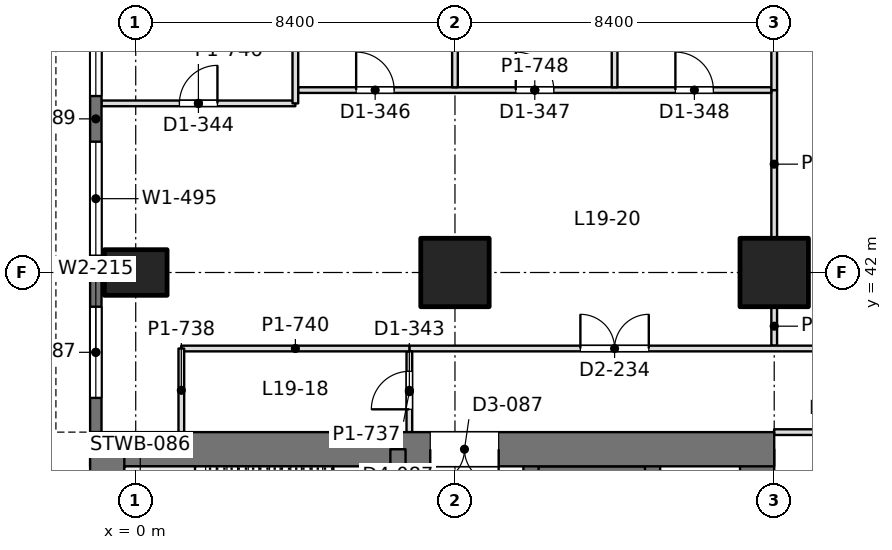
"""IFC4 building model, lengths in metres.
Left out: names, types, materials, properties, quantities, classifications, styles, units other than length and angle.
Written with IfcOpenShell. Run it as: python <this file> out.ifc"""

import sys

from ifc_helpers import new_model, si_unit, direction, frame, frame_2d, origin, origin_2d, place, context, subcontext, project, spatial, rectangle, extrude, element, fill, save


model = new_model("IFC4")
c1 = context("Model", 3, precision=1e-05, world=origin(), true_north=direction((0.0, 1.0)))
c2 = subcontext(c1, "Body", "Model", "MODEL_VIEW")
j1 = project(units=[si_unit("LENGTHUNIT", "METRE"), si_unit("PLANEANGLEUNIT", "RADIAN")], contexts=[c1])
p1 = place(None, origin())
s1 = spatial("IfcSite", under=j1, at=p1, CompositionType="ELEMENT")
p2 = place(p1, origin())
s2 = spatial("IfcBuilding", under=s1, at=p2, CompositionType="ELEMENT")
p3 = place(p2, frame((0.0, 0.0, 86.4)))
s3 = spatial("IfcBuildingStorey", under=s2, at=p3, CompositionType="ELEMENT", Elevation=86.4)
p4 = place(p3, frame((0.0, 42.0, 0.0), z_axis=(0.0, 0.0, 1.0), x_axis=(0.0, 1.0, 0.0)))
e1 = element("IfcColumn", 1, at=p4, inside=s3, PredefinedType="COLUMN", context=c2, shape_type="SweptSolid", body=[
    extrude(rectangle(XDim=1.2, YDim=1.65, at=origin_2d()), origin(), (0.0, 0.0, 1.0), 4.5),
])
for number, where, z_axis, x_axis in (
    (2, (8.4, 42.0, 0.0), (0.0, 0.0, 1.0), (1.0, 0.0, 0.0)),
    (3, (16.8, 42.0, 0.0), (0.0, 0.0, 1.0), (1.0, 0.0, 0.0)),
):
    element("IfcColumn", number, at=place(p3, frame(where, z_axis=z_axis, x_axis=x_axis)), inside=s3, PredefinedType="COLUMN", context=c2, shape_type="SweptSolid", body=[
        extrude(rectangle(XDim=1.8, YDim=1.8, at=origin_2d()), origin(), (0.0, 0.0, 1.0), 4.5),
    ])
p5 = place(p3, frame((-1.2, 37.35, 0.0), z_axis=(0.0, 0.0, 1.0), x_axis=(1.0, 0.0, 0.0)))
e4 = element("IfcWall", 4, at=p5, inside=s3, PredefinedType="SHEAR", context=c2, shape_type="SweptSolid", body=[
    extrude(rectangle(XDim=18.0, YDim=0.9, at=frame_2d((9.0, 0.0))), origin(), (0.0, 0.0, 1.0), 4.5),
])
p6 = place(p5, frame((8.95, 0.0, 0.0)))
e5 = element("IfcOpeningElement", 5, at=p6, cuts=e4, PredefinedType="OPENING", context=c2, shape_type="SweptSolid", body=[
    extrude(rectangle(XDim=1.8, YDim=2.4, at=frame_2d((0.9, 1.2))), frame((0.0, 0.46, 0.0), z_axis=(0.0, -1.0, 0.0), x_axis=(1.0, 0.0, 0.0)), (0.0, 0.0, 1.0), 0.92),
])
for number, where, z_axis, x_axis in (
    (6, (-0.75, 13.05, 0.0), (0.0, 0.0, 1.0), (0.0, 1.0, 0.0)),
    (7, (16.35, 13.05, 0.0), (0.0, 0.0, 1.0), (0.0, 1.0, 0.0)),
):
    element("IfcWall", number, at=place(p3, frame(where, z_axis=z_axis, x_axis=x_axis)), inside=s3, PredefinedType="SHEAR", context=c2, shape_type="SweptSolid", body=[
        extrude(rectangle(XDim=24.3, YDim=0.9, at=frame_2d((12.15, 0.0))), origin(), (0.0, 0.0, 1.0), 4.5),
    ])
p7 = place(p3, frame((6.9, 13.05, 0.0), z_axis=(0.0, 0.0, 1.0), x_axis=(0.0, 1.0, 0.0)))
e8 = element("IfcWall", 8, at=p7, inside=s3, PredefinedType="SHEAR", context=c2, shape_type="SweptSolid", body=[
    extrude(rectangle(XDim=24.3, YDim=0.4, at=frame_2d((12.15, 0.0))), origin(), (0.0, 0.0, 1.0), 4.5),
])
p8 = place(p7, frame((1.3, 0.0, 0.0)))
e9 = element("IfcOpeningElement", 9, at=p8, cuts=e8, PredefinedType="OPENING", context=c2, shape_type="SweptSolid", body=[
    extrude(rectangle(XDim=1.0, YDim=2.2, at=frame_2d((0.5, 1.1))), frame((0.0, 0.21, 0.0), z_axis=(0.0, -1.0, 0.0), x_axis=(1.0, 0.0, 0.0)), (0.0, 0.0, 1.0), 0.42),
])
p9 = place(p7, frame((22.0, 0.0, 0.0)))
e10 = element("IfcOpeningElement", 10, at=p9, cuts=e8, PredefinedType="OPENING", context=c2, shape_type="SweptSolid", body=[
    extrude(rectangle(XDim=1.0, YDim=2.2, at=frame_2d((0.5, 1.1))), frame((0.0, 0.21, 0.0), z_axis=(0.0, -1.0, 0.0), x_axis=(1.0, 0.0, 0.0)), (0.0, 0.0, 1.0), 0.42),
])
p10 = place(p7, frame((5.55, 0.0, 0.0)))
e11 = element("IfcOpeningElement", 11, at=p10, cuts=e8, PredefinedType="OPENING", context=c2, shape_type="SweptSolid", body=[
    extrude(rectangle(XDim=1.0, YDim=2.2, at=frame_2d((0.5, 1.1))), frame((0.0, 0.21, 0.0), z_axis=(0.0, -1.0, 0.0), x_axis=(1.0, 0.0, 0.0)), (0.0, 0.0, 1.0), 0.42),
])
p11 = place(p7, frame((9.55, 0.0, 0.0)))
e12 = element("IfcOpeningElement", 12, at=p11, cuts=e8, PredefinedType="OPENING", context=c2, shape_type="SweptSolid", body=[
    extrude(rectangle(XDim=1.0, YDim=2.2, at=frame_2d((0.5, 1.1))), frame((0.0, 0.21, 0.0), z_axis=(0.0, -1.0, 0.0), x_axis=(1.0, 0.0, 0.0)), (0.0, 0.0, 1.0), 0.42),
])
p12 = place(p7, frame((12.8, 0.0, 0.0)))
e13 = element("IfcOpeningElement", 13, at=p12, cuts=e8, PredefinedType="OPENING", context=c2, shape_type="SweptSolid", body=[
    extrude(rectangle(XDim=1.1, YDim=2.2, at=frame_2d((0.55, 1.1))), frame((0.0, 0.21, 0.0), z_axis=(0.0, -1.0, 0.0), x_axis=(1.0, 0.0, 0.0)), (0.0, 0.0, 1.0), 0.42),
])
p13 = place(p7, frame((15.538, 0.0, 0.0)))
e14 = element("IfcOpeningElement", 14, at=p13, cuts=e8, PredefinedType="OPENING", context=c2, shape_type="SweptSolid", body=[
    extrude(rectangle(XDim=1.1, YDim=2.2, at=frame_2d((0.55, 1.1))), frame((0.0, 0.21, 0.0), z_axis=(0.0, -1.0, 0.0), x_axis=(1.0, 0.0, 0.0)), (0.0, 0.0, 1.0), 0.42),
])
p14 = place(p7, frame((18.262, 0.0, 0.0)))
e15 = element("IfcOpeningElement", 15, at=p14, cuts=e8, PredefinedType="OPENING", context=c2, shape_type="SweptSolid", body=[
    extrude(rectangle(XDim=1.1, YDim=2.2, at=frame_2d((0.55, 1.1))), frame((0.0, 0.21, 0.0), z_axis=(0.0, -1.0, 0.0), x_axis=(1.0, 0.0, 0.0)), (0.0, 0.0, 1.0), 0.42),
])
p15 = place(p3, frame((10.4, 13.05, 0.0), z_axis=(0.0, 0.0, 1.0), x_axis=(0.0, 1.0, 0.0)))
e16 = element("IfcWall", 16, at=p15, inside=s3, PredefinedType="SHEAR", context=c2, shape_type="SweptSolid", body=[
    extrude(rectangle(XDim=24.3, YDim=0.4, at=frame_2d((12.15, 0.0))), origin(), (0.0, 0.0, 1.0), 4.5),
])
p16 = place(p15, frame((1.5, 0.0, 0.0)))
e17 = element("IfcOpeningElement", 17, at=p16, cuts=e16, PredefinedType="OPENING", context=c2, shape_type="SweptSolid", body=[
    extrude(rectangle(XDim=1.1, YDim=2.2, at=frame_2d((0.55, 1.1))), frame((0.0, 0.21, 0.0), z_axis=(0.0, -1.0, 0.0), x_axis=(1.0, 0.0, 0.0)), (0.0, 0.0, 1.0), 0.42),
])
p17 = place(p15, frame((4.35, 0.0, 0.0)))
e18 = element("IfcOpeningElement", 18, at=p17, cuts=e16, PredefinedType="OPENING", context=c2, shape_type="SweptSolid", body=[
    extrude(rectangle(XDim=1.1, YDim=2.2, at=frame_2d((0.55, 1.1))), frame((0.0, 0.21, 0.0), z_axis=(0.0, -1.0, 0.0), x_axis=(1.0, 0.0, 0.0)), (0.0, 0.0, 1.0), 0.42),
])
p18 = place(p15, frame((7.2, 0.0, 0.0)))
e19 = element("IfcOpeningElement", 19, at=p18, cuts=e16, PredefinedType="OPENING", context=c2, shape_type="SweptSolid", body=[
    extrude(rectangle(XDim=1.1, YDim=2.2, at=frame_2d((0.55, 1.1))), frame((0.0, 0.21, 0.0), z_axis=(0.0, -1.0, 0.0), x_axis=(1.0, 0.0, 0.0)), (0.0, 0.0, 1.0), 0.42),
])
p19 = place(p15, frame((21.45, 0.0, 0.0)))
e20 = element("IfcOpeningElement", 20, at=p19, cuts=e16, PredefinedType="OPENING", context=c2, shape_type="SweptSolid", body=[
    extrude(rectangle(XDim=1.1, YDim=2.2, at=frame_2d((0.55, 1.1))), frame((0.0, 0.21, 0.0), z_axis=(0.0, -1.0, 0.0), x_axis=(1.0, 0.0, 0.0)), (0.0, 0.0, 1.0), 0.42),
])
p20 = place(p3, frame((13.6, 13.05, 0.0), z_axis=(0.0, 0.0, 1.0), x_axis=(0.0, 1.0, 0.0)))
e21 = element("IfcWall", 21, at=p20, inside=s3, PredefinedType="SHEAR", context=c2, shape_type="SweptSolid", body=[
    extrude(rectangle(XDim=24.3, YDim=0.4, at=frame_2d((12.15, 0.0))), origin(), (0.0, 0.0, 1.0), 4.5),
])
p21 = place(p3, frame((10.4, 36.625, 0.0), z_axis=(0.0, 0.0, 1.0), x_axis=(1.0, 0.0, 0.0)))
e22 = element("IfcWall", 22, at=p21, inside=s3, PredefinedType="SHEAR", context=c2, shape_type="SweptSolid", body=[
    extrude(rectangle(XDim=3.2, YDim=0.55, at=frame_2d((1.6, 0.0))), origin(), (0.0, 0.0, 1.0), 4.5),
])
p22 = place(p3, frame((-1.05, 37.8, 0.0), z_axis=(0.0, 0.0, 1.0), x_axis=(0.0, 1.0, 0.0)))
e23 = element("IfcWall", 23, at=p22, inside=s3, PredefinedType="SOLIDWALL", context=c2, shape_type="SweptSolid", body=[
    extrude(rectangle(XDim=4.2, YDim=0.3, at=frame_2d((2.1, 0.0))), origin(), (0.0, 0.0, 1.0), 4.3),
])
p23 = place(p22, frame((0.9, 0.0, 0.9)))
e24 = element("IfcOpeningElement", 24, at=p23, cuts=e23, PredefinedType="OPENING", context=c2, shape_type="SweptSolid", body=[
    extrude(rectangle(XDim=2.4, YDim=1.9, at=frame_2d((1.2, 0.95))), frame((0.0, 0.16, 0.0), z_axis=(0.0, -1.0, 0.0), x_axis=(1.0, 0.0, 0.0)), (0.0, 0.0, 1.0), 0.32),
])
p24 = place(p3, frame((-1.05, 42.0, 0.0), z_axis=(0.0, 0.0, 1.0), x_axis=(0.0, 1.0, 0.0)))
e25 = element("IfcWall", 25, at=p24, inside=s3, PredefinedType="SOLIDWALL", context=c2, shape_type="SweptSolid", body=[
    extrude(rectangle(XDim=8.085, YDim=0.3, at=frame_2d((4.042, 0.0))), origin(), (0.0, 0.0, 1.0), 4.3),
])
p25 = place(p24, frame((0.443, 0.0, 0.9)))
e26 = element("IfcOpeningElement", 26, at=p25, cuts=e25, PredefinedType="OPENING", context=c2, shape_type="SweptSolid", body=[
    extrude(rectangle(XDim=3.0, YDim=1.9, at=frame_2d((1.5, 0.95))), frame((0.0, 0.16, 0.0), z_axis=(0.0, -1.0, 0.0), x_axis=(1.0, 0.0, 0.0)), (0.0, 0.0, 1.0), 0.32),
])
p26 = place(p24, frame((4.643, 0.0, 0.9)))
e27 = element("IfcOpeningElement", 27, at=p26, cuts=e25, PredefinedType="OPENING", context=c2, shape_type="SweptSolid", body=[
    extrude(rectangle(XDim=3.0, YDim=1.9, at=frame_2d((1.5, 0.95))), frame((0.0, 0.16, 0.0), z_axis=(0.0, -1.0, 0.0), x_axis=(1.0, 0.0, 0.0)), (0.0, 0.0, 1.0), 0.32),
])
p27 = place(p3, frame((-0.902, 46.45, 0.0), z_axis=(0.0, 0.0, 1.0), x_axis=(1.0, 0.0, 0.0)))
e28 = element("IfcWall", 28, at=p27, inside=s3, PredefinedType="PARTITIONING", context=c2, shape_type="SweptSolid", body=[
    extrude(rectangle(XDim=5.102, YDim=0.15, at=frame_2d((2.551, 0.0))), origin(), (0.0, 0.0, 1.0), 3.7),
])
p28 = place(p27, frame((2.052, 0.0, 0.0)))
e29 = element("IfcOpeningElement", 29, at=p28, cuts=e28, PredefinedType="OPENING", context=c2, shape_type="SweptSolid", body=[
    extrude(rectangle(XDim=1.0, YDim=2.2, at=frame_2d((0.5, 1.1))), frame((0.0, 0.085, 0.0), z_axis=(0.0, -1.0, 0.0), x_axis=(1.0, 0.0, 0.0)), (0.0, 0.0, 1.0), 0.17),
])
p29 = place(p3, frame((4.274, 46.8, 0.0), z_axis=(0.0, 0.0, 1.0), x_axis=(1.0, 0.0, 0.0)))
e30 = element("IfcWall", 30, at=p29, inside=s3, PredefinedType="PARTITIONING", context=c2, shape_type="SweptSolid", body=[
    extrude(rectangle(XDim=12.452, YDim=0.15, at=frame_2d((6.226, 0.0))), origin(), (0.0, 0.0, 1.0), 3.6),
])
p30 = place(p29, frame((1.526, 0.0, 0.0)))
e31 = element("IfcOpeningElement", 31, at=p30, cuts=e30, PredefinedType="OPENING", context=c2, shape_type="SweptSolid", body=[
    extrude(rectangle(XDim=1.0, YDim=2.2, at=frame_2d((0.5, 1.1))), frame((0.0, 0.085, 0.0), z_axis=(0.0, -1.0, 0.0), x_axis=(1.0, 0.0, 0.0)), (0.0, 0.0, 1.0), 0.17),
])
p31 = place(p29, frame((5.726, 0.0, 0.0)))
e32 = element("IfcOpeningElement", 32, at=p31, cuts=e30, PredefinedType="OPENING", context=c2, shape_type="SweptSolid", body=[
    extrude(rectangle(XDim=1.0, YDim=2.2, at=frame_2d((0.5, 1.1))), frame((0.0, 0.085, 0.0), z_axis=(0.0, -1.0, 0.0), x_axis=(1.0, 0.0, 0.0)), (0.0, 0.0, 1.0), 0.17),
])
p32 = place(p29, frame((9.926, 0.0, 0.0)))
e33 = element("IfcOpeningElement", 33, at=p32, cuts=e30, PredefinedType="OPENING", context=c2, shape_type="SweptSolid", body=[
    extrude(rectangle(XDim=1.0, YDim=2.2, at=frame_2d((0.5, 1.1))), frame((0.0, 0.085, 0.0), z_axis=(0.0, -1.0, 0.0), x_axis=(1.0, 0.0, 0.0)), (0.0, 0.0, 1.0), 0.17),
])
p33 = place(p3, frame((4.2, 46.45, 0.0), z_axis=(0.0, 0.0, 1.0), x_axis=(0.0, 1.0, 0.0)))
e34 = element("IfcWall", 34, at=p33, inside=s3, PredefinedType="PARTITIONING", context=c2, shape_type="SweptSolid", body=[
    extrude(rectangle(XDim=4.852, YDim=0.15, at=frame_2d((2.426, 0.0))), origin(), (0.0, 0.0, 1.0), 3.854),
])
p34 = place(p3, frame((8.4, 46.874, 0.0), z_axis=(0.0, 0.0, 1.0), x_axis=(0.0, 1.0, 0.0)))
e35 = element("IfcWall", 35, at=p34, inside=s3, PredefinedType="PARTITIONING", context=c2, shape_type="SweptSolid", body=[
    extrude(rectangle(XDim=2.727, YDim=0.15, at=frame_2d((1.364, 0.0))), origin(), (0.0, 0.0, 1.0), 3.6),
])
p35 = place(p3, frame((12.6, 46.874, 0.0), z_axis=(0.0, 0.0, 1.0), x_axis=(0.0, 1.0, 0.0)))
e36 = element("IfcWall", 36, at=p35, inside=s3, PredefinedType="PARTITIONING", context=c2, shape_type="SweptSolid", body=[
    extrude(rectangle(XDim=4.428, YDim=0.15, at=frame_2d((2.214, 0.0))), origin(), (0.0, 0.0, 1.0), 3.854),
])
p36 = place(p3, frame((16.8, 46.798, 0.0), z_axis=(0.0, 0.0, 1.0), x_axis=(0.0, 1.0, 0.0)))
e37 = element("IfcWall", 37, at=p36, inside=s3, PredefinedType="PARTITIONING", context=c2, shape_type="SweptSolid", body=[
    extrude(rectangle(XDim=2.803, YDim=0.15, at=frame_2d((1.401, 0.0))), origin(), (0.0, 0.0, 1.0), 3.6),
])
p37 = place(p3, frame((16.8, 40.074, 0.0), z_axis=(0.0, 0.0, 1.0), x_axis=(0.0, 1.0, 0.0)))
e38 = element("IfcWall", 38, at=p37, inside=s3, PredefinedType="PARTITIONING", context=c2, shape_type="SweptSolid", body=[
    extrude(rectangle(XDim=1.027, YDim=0.15, at=frame_2d((0.514, 0.0))), origin(), (0.0, 0.0, 1.0), 3.804),
])
p38 = place(p3, frame((16.8, 42.899, 0.0), z_axis=(0.0, 0.0, 1.0), x_axis=(0.0, 1.0, 0.0)))
e39 = element("IfcWall", 39, at=p38, inside=s3, PredefinedType="PARTITIONING", context=c2, shape_type="SweptSolid", body=[
    extrude(rectangle(XDim=3.903, YDim=0.15, at=frame_2d((1.952, 0.0))), origin(), (0.0, 0.0, 1.0), 3.6),
])
p39 = place(p3, frame((7.198, 40.0, 0.0), z_axis=(0.0, 0.0, 1.0), x_axis=(1.0, 0.0, 0.0)))
e40 = element("IfcWall", 40, at=p39, inside=s3, PredefinedType="PARTITIONING", context=c2, shape_type="SweptSolid", body=[
    extrude(rectangle(XDim=42.002, YDim=0.15, at=frame_2d((21.001, 0.0))), origin(), (0.0, 0.0, 1.0), 3.6),
])
p40 = place(p39, frame((4.502, 0.0, 0.0)))
e41 = element("IfcOpeningElement", 41, at=p40, cuts=e40, PredefinedType="OPENING", context=c2, shape_type="SweptSolid", body=[
    extrude(rectangle(XDim=1.8, YDim=2.2, at=frame_2d((0.9, 1.1))), frame((0.0, 0.085, 0.0), z_axis=(0.0, -1.0, 0.0), x_axis=(1.0, 0.0, 0.0)), (0.0, 0.0, 1.0), 0.17),
])
p41 = place(p39, frame((12.902, 0.0, 0.0)))
e42 = element("IfcOpeningElement", 42, at=p41, cuts=e40, PredefinedType="OPENING", context=c2, shape_type="SweptSolid", body=[
    extrude(rectangle(XDim=1.8, YDim=2.2, at=frame_2d((0.9, 1.1))), frame((0.0, 0.085, 0.0), z_axis=(0.0, -1.0, 0.0), x_axis=(1.0, 0.0, 0.0)), (0.0, 0.0, 1.0), 0.17),
])
p42 = place(p39, frame((21.302, 0.0, 0.0)))
e43 = element("IfcOpeningElement", 43, at=p42, cuts=e40, PredefinedType="OPENING", context=c2, shape_type="SweptSolid", body=[
    extrude(rectangle(XDim=1.8, YDim=2.2, at=frame_2d((0.9, 1.1))), frame((0.0, 0.085, 0.0), z_axis=(0.0, -1.0, 0.0), x_axis=(1.0, 0.0, 0.0)), (0.0, 0.0, 1.0), 0.17),
])
p43 = place(p39, frame((29.702, 0.0, 0.0)))
e44 = element("IfcOpeningElement", 44, at=p43, cuts=e40, PredefinedType="OPENING", context=c2, shape_type="SweptSolid", body=[
    extrude(rectangle(XDim=1.8, YDim=2.2, at=frame_2d((0.9, 1.1))), frame((0.0, 0.085, 0.0), z_axis=(0.0, -1.0, 0.0), x_axis=(1.0, 0.0, 0.0)), (0.0, 0.0, 1.0), 0.17),
])
p44 = place(p39, frame((38.102, 0.0, 0.0)))
e45 = element("IfcOpeningElement", 45, at=p44, cuts=e40, PredefinedType="OPENING", context=c2, shape_type="SweptSolid", body=[
    extrude(rectangle(XDim=1.8, YDim=2.2, at=frame_2d((0.9, 1.1))), frame((0.0, 0.085, 0.0), z_axis=(0.0, -1.0, 0.0), x_axis=(1.0, 0.0, 0.0)), (0.0, 0.0, 1.0), 0.17),
])
p45 = place(p3, frame((7.2, 37.8, 0.0), z_axis=(0.0, 0.0, 1.0), x_axis=(0.0, 1.0, 0.0)))
e46 = element("IfcWall", 46, at=p45, inside=s3, PredefinedType="PARTITIONING", context=c2, shape_type="SweptSolid", body=[
    extrude(rectangle(XDim=2.126, YDim=0.15, at=frame_2d((1.063, 0.0))), origin(), (0.0, 0.0, 1.0), 4.3),
])
p46 = place(p45, frame((0.6, 0.0, 0.0)))
e47 = element("IfcOpeningElement", 47, at=p46, cuts=e46, PredefinedType="OPENING", context=c2, shape_type="SweptSolid", body=[
    extrude(rectangle(XDim=1.0, YDim=2.2, at=frame_2d((0.5, 1.1))), frame((0.0, 0.085, 0.0), z_axis=(0.0, -1.0, 0.0), x_axis=(1.0, 0.0, 0.0)), (0.0, 0.0, 1.0), 0.17),
])
p47 = place(p3, frame((1.2, 40.0, 0.0), z_axis=(0.0, 0.0, 1.0), x_axis=(1.0, 0.0, 0.0)))
e48 = element("IfcWall", 48, at=p47, inside=s3, PredefinedType="PARTITIONING", context=c2, shape_type="SweptSolid", body=[
    extrude(rectangle(XDim=6.002, YDim=0.15, at=frame_2d((3.001, 0.0))), origin(), (0.0, 0.0, 1.0), 3.7),
])
p48 = place(p3, frame((1.2, 37.8, 0.0), z_axis=(0.0, 0.0, 1.0), x_axis=(0.0, 1.0, 0.0)))
e49 = element("IfcWall", 49, at=p48, inside=s3, PredefinedType="PARTITIONING", context=c2, shape_type="SweptSolid", body=[
    extrude(rectangle(XDim=2.2, YDim=0.15, at=frame_2d((1.1, 0.0))), origin(), (0.0, 0.0, 1.0), 4.3),
])
p49 = place(p3, frame((16.798, 37.8, 0.0), z_axis=(0.0, 0.0, 1.0), x_axis=(1.0, 0.0, 0.0)))
e50 = element("IfcWall", 50, at=p49, inside=s3, PredefinedType="PARTITIONING", context=c2, shape_type="SweptSolid", body=[
    extrude(rectangle(XDim=16.804, YDim=0.15, at=frame_2d((8.402, 0.0))), origin(), (0.0, 0.0, 1.0), 3.6),
])
p50 = place(p49, frame((1.352, 0.0, 0.0)))
e51 = element("IfcOpeningElement", 51, at=p50, cuts=e50, PredefinedType="OPENING", context=c2, shape_type="SweptSolid", body=[
    extrude(rectangle(XDim=1.0, YDim=2.2, at=frame_2d((0.5, 1.1))), frame((0.0, 0.085, 0.0), z_axis=(0.0, -1.0, 0.0), x_axis=(1.0, 0.0, 0.0)), (0.0, 0.0, 1.0), 0.17),
])
p51 = place(p49, frame((7.852, 0.0, 0.0)))
e52 = element("IfcOpeningElement", 52, at=p51, cuts=e50, PredefinedType="OPENING", context=c2, shape_type="SweptSolid", body=[
    extrude(rectangle(XDim=1.0, YDim=2.2, at=frame_2d((0.5, 1.1))), frame((0.0, 0.085, 0.0), z_axis=(0.0, -1.0, 0.0), x_axis=(1.0, 0.0, 0.0)), (0.0, 0.0, 1.0), 0.17),
])
p52 = place(p49, frame((14.402, 0.0, 0.0)))
e53 = element("IfcOpeningElement", 53, at=p52, cuts=e50, PredefinedType="OPENING", context=c2, shape_type="SweptSolid", body=[
    extrude(rectangle(XDim=1.0, YDim=2.2, at=frame_2d((0.5, 1.1))), frame((0.0, 0.085, 0.0), z_axis=(0.0, -1.0, 0.0), x_axis=(1.0, 0.0, 0.0)), (0.0, 0.0, 1.0), 0.17),
])
p53 = place(p23, origin())
e54 = element("IfcWindow", 54, at=p53, inside=s3, PartitioningType="SINGLE_PANEL", PredefinedType="WINDOW", context=c2, shape_type="SweptSolid", body=[
    extrude(rectangle(XDim=2.4, YDim=1.9, at=frame_2d((1.2, 0.95))), frame((0.0, 0.03, 0.0), z_axis=(0.0, -1.0, 0.0), x_axis=(1.0, 0.0, 0.0)), (0.0, 0.0, 1.0), 0.06),
])
fill(e24, e54)
p54 = place(p25, origin())
e55 = element("IfcWindow", 55, at=p54, inside=s3, PartitioningType="SINGLE_PANEL", PredefinedType="WINDOW", context=c2, shape_type="SweptSolid", body=[
    extrude(rectangle(XDim=3.0, YDim=1.9, at=frame_2d((1.5, 0.95))), frame((0.0, 0.03, 0.0), z_axis=(0.0, -1.0, 0.0), x_axis=(1.0, 0.0, 0.0)), (0.0, 0.0, 1.0), 0.06),
])
fill(e26, e55)
p55 = place(p26, origin())
e56 = element("IfcWindow", 56, at=p55, inside=s3, PartitioningType="SINGLE_PANEL", PredefinedType="WINDOW", context=c2, shape_type="SweptSolid", body=[
    extrude(rectangle(XDim=3.0, YDim=1.9, at=frame_2d((1.5, 0.95))), frame((0.0, 0.03, 0.0), z_axis=(0.0, -1.0, 0.0), x_axis=(1.0, 0.0, 0.0)), (0.0, 0.0, 1.0), 0.06),
])
fill(e27, e56)
p56 = place(p6, frame((1.8, 0.0, 0.0), z_axis=(0.0, 0.0, 1.0), x_axis=(-1.0, 0.0, 0.0)))
e57 = element("IfcDoor", 57, at=p56, inside=s3, OperationType="DOUBLE_DOOR_SINGLE_SWING", PredefinedType="DOOR", context=c2, shape_type="SweptSolid", body=[
    extrude(rectangle(XDim=1.8, YDim=2.4, at=frame_2d((0.9, 1.2))), frame((0.0, 0.025, 0.0), z_axis=(0.0, -1.0, 0.0), x_axis=(1.0, 0.0, 0.0)), (0.0, 0.0, 1.0), 0.05),
])
fill(e5, e57)
p57 = place(p28, origin())
e58 = element("IfcDoor", 58, at=p57, inside=s3, OperationType="SINGLE_SWING_RIGHT", PredefinedType="DOOR", context=c2, shape_type="SweptSolid", body=[
    extrude(rectangle(XDim=1.0, YDim=2.2, at=frame_2d((0.5, 1.1))), frame((0.0, 0.025, 0.0), z_axis=(0.0, -1.0, 0.0), x_axis=(1.0, 0.0, 0.0)), (0.0, 0.0, 1.0), 0.05),
])
fill(e29, e58)
p58 = place(p30, origin())
e59 = element("IfcDoor", 59, at=p58, inside=s3, OperationType="SINGLE_SWING_LEFT", PredefinedType="DOOR", context=c2, shape_type="SweptSolid", body=[
    extrude(rectangle(XDim=1.0, YDim=2.2, at=frame_2d((0.5, 1.1))), frame((0.0, 0.025, 0.0), z_axis=(0.0, -1.0, 0.0), x_axis=(1.0, 0.0, 0.0)), (0.0, 0.0, 1.0), 0.05),
])
fill(e31, e59)
p59 = place(p31, origin())
e60 = element("IfcDoor", 60, at=p59, inside=s3, OperationType="SINGLE_SWING_LEFT", PredefinedType="DOOR", context=c2, shape_type="SweptSolid", body=[
    extrude(rectangle(XDim=1.0, YDim=2.2, at=frame_2d((0.5, 1.1))), frame((0.0, 0.025, 0.0), z_axis=(0.0, -1.0, 0.0), x_axis=(1.0, 0.0, 0.0)), (0.0, 0.0, 1.0), 0.05),
])
fill(e32, e60)
p60 = place(p32, origin())
e61 = element("IfcDoor", 61, at=p60, inside=s3, OperationType="SINGLE_SWING_LEFT", PredefinedType="DOOR", context=c2, shape_type="SweptSolid", body=[
    extrude(rectangle(XDim=1.0, YDim=2.2, at=frame_2d((0.5, 1.1))), frame((0.0, 0.025, 0.0), z_axis=(0.0, -1.0, 0.0), x_axis=(1.0, 0.0, 0.0)), (0.0, 0.0, 1.0), 0.05),
])
fill(e33, e61)
p61 = place(p40, origin())
e62 = element("IfcDoor", 62, at=p61, inside=s3, OperationType="DOUBLE_DOOR_SINGLE_SWING", PredefinedType="DOOR", context=c2, shape_type="SweptSolid", body=[
    extrude(rectangle(XDim=1.8, YDim=2.2, at=frame_2d((0.9, 1.1))), frame((0.0, 0.025, 0.0), z_axis=(0.0, -1.0, 0.0), x_axis=(1.0, 0.0, 0.0)), (0.0, 0.0, 1.0), 0.05),
])
fill(e41, e62)
p62 = place(p46, origin())
e63 = element("IfcDoor", 63, at=p62, inside=s3, OperationType="SINGLE_SWING_LEFT", PredefinedType="DOOR", context=c2, shape_type="SweptSolid", body=[
    extrude(rectangle(XDim=1.0, YDim=2.2, at=frame_2d((0.5, 1.1))), frame((0.0, 0.025, 0.0), z_axis=(0.0, -1.0, 0.0), x_axis=(1.0, 0.0, 0.0)), (0.0, 0.0, 1.0), 0.05),
])
fill(e47, e63)
save(model, sys.argv[1])
